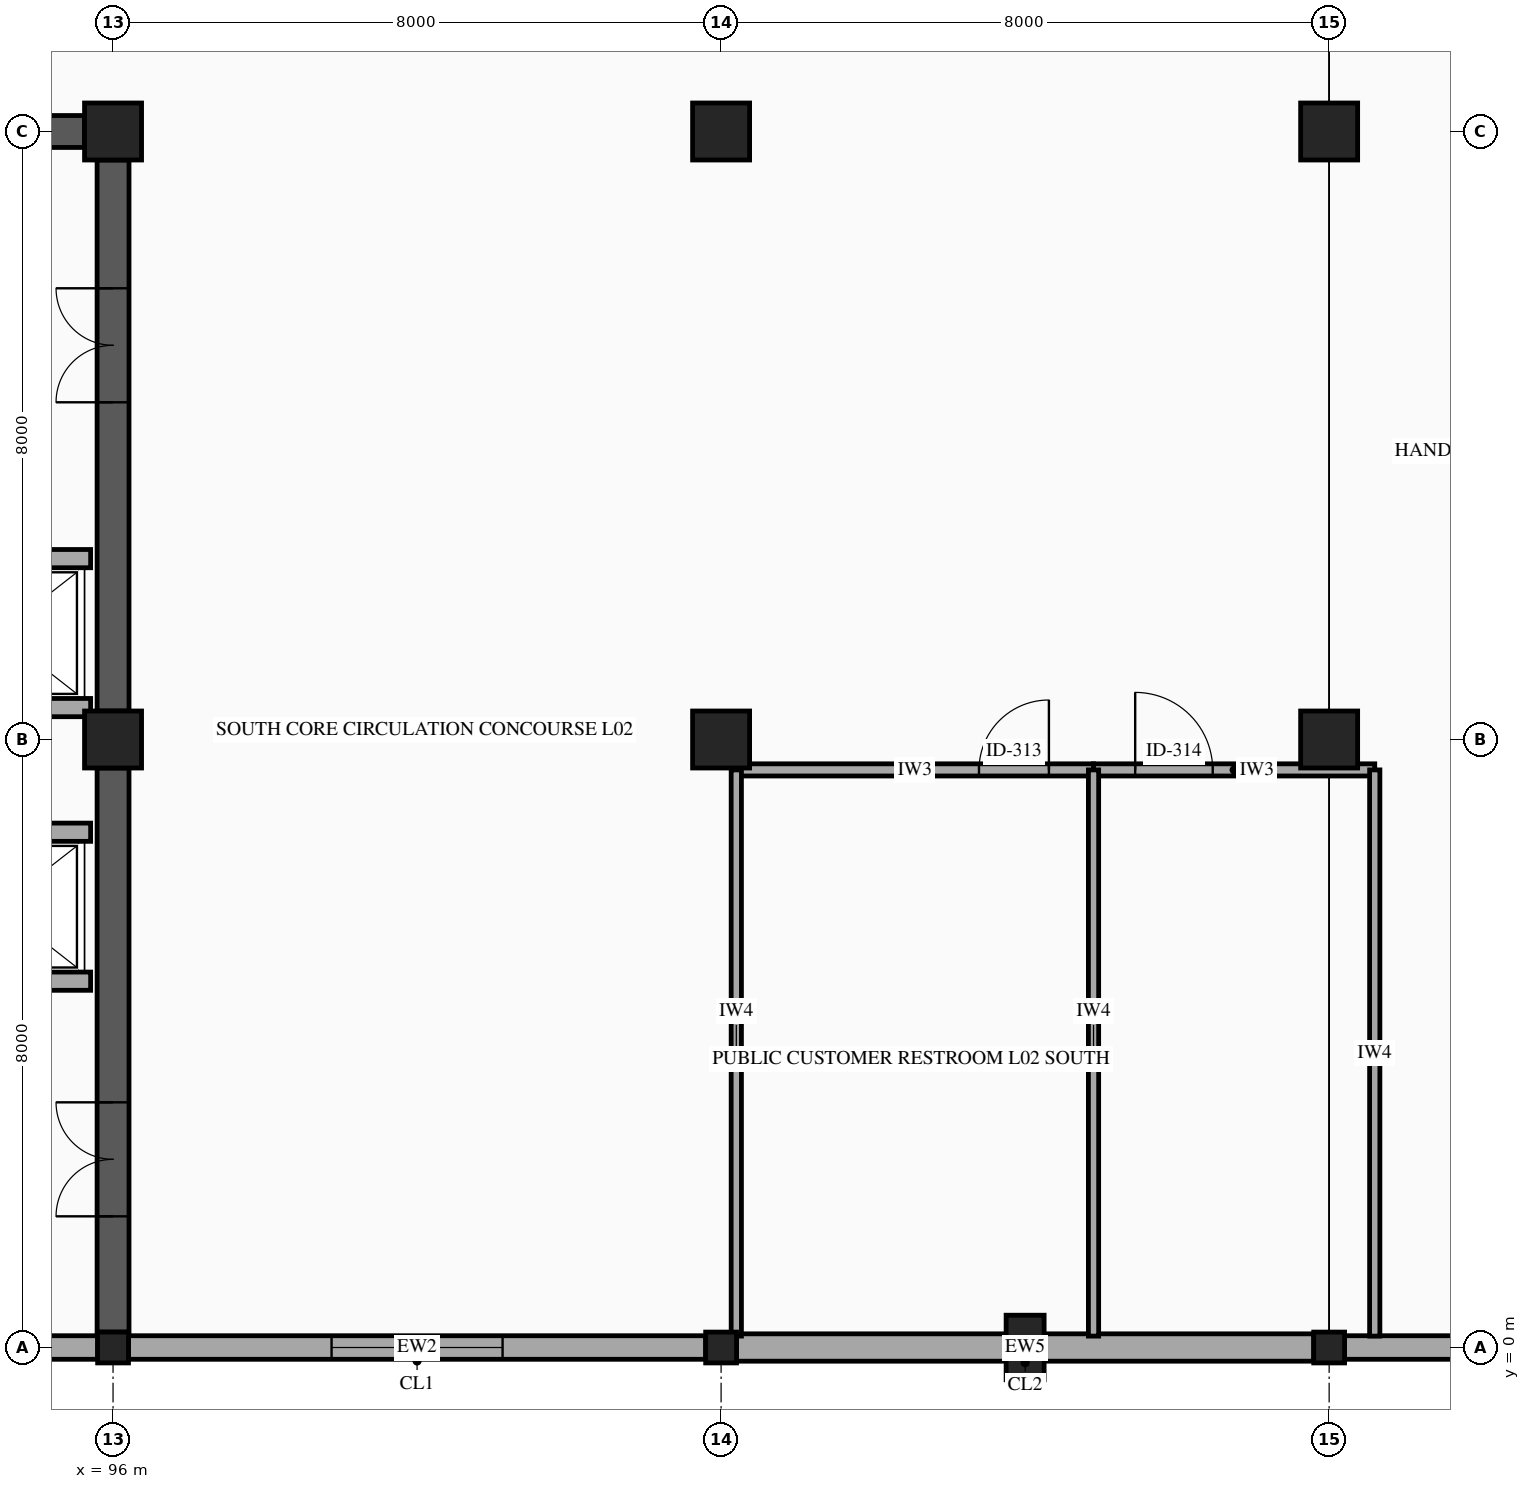
"""IFC4 building model, lengths in metres.
Left out: names, types, materials, properties, quantities, classifications, styles, units other than length and angle.
Written with IfcOpenShell. Run it as: python <this file> out.ifc"""

import sys

from ifc_helpers import new_model, si_unit, direction, frame, frame_2d, origin, origin_2d, place, context, subcontext, project, spatial, rectangle, hollow_rectangle, extrude, element, fill, save


model = new_model("IFC4")
c1 = context("Model", 3, precision=1e-05, world=origin(), true_north=direction((0.0, 1.0)))
c2 = subcontext(c1, "Body", "Model", "MODEL_VIEW")
j1 = project(units=[si_unit("LENGTHUNIT", "METRE"), si_unit("PLANEANGLEUNIT", "RADIAN")], contexts=[c1])
p1 = place(None, origin())
s1 = spatial("IfcSite", under=j1, at=p1, CompositionType="ELEMENT")
p2 = place(p1, origin())
s2 = spatial("IfcBuilding", under=s1, at=p2, CompositionType="ELEMENT")
p3 = place(p2, frame((0.0, 0.0, 10.4)))
s3 = spatial("IfcBuildingStorey", under=s2, at=p3, CompositionType="ELEMENT", Elevation=10.4)
p4 = place(p3, frame((96.0, 0.0, 0.0), z_axis=(0.0, 0.0, 1.0), x_axis=(1.0, 0.0, 0.0)))
e1 = element("IfcColumn", 1, at=p4, inside=s3, PredefinedType="COLUMN", context=c2, shape_type="SweptSolid", body=[
    extrude(hollow_rectangle(XDim=0.406, YDim=0.406, WallThickness=0.015, InnerFilletRadius=0.015, OuterFilletRadius=0.029, at=origin_2d()), origin(), (0.0, 0.0, 1.0), 4.5),
])
for number, where, z_axis, x_axis in (
    (2, (96.0, 8.0, 0.0), (0.0, 0.0, 1.0), (1.0, 0.0, 0.0)),
    (3, (96.0, 16.0, 0.0), (0.0, 0.0, 1.0), (1.0, 0.0, 0.0)),
):
    element("IfcColumn", number, at=place(p3, frame(where, z_axis=z_axis, x_axis=x_axis)), inside=s3, PredefinedType="COLUMN", context=c2, shape_type="SweptSolid", body=[
        extrude(rectangle(XDim=0.75, YDim=0.75, at=origin_2d()), origin(), (0.0, 0.0, 1.0), 4.5),
    ])
p5 = place(p3, frame((104.0, 0.0, 0.0), z_axis=(0.0, 0.0, 1.0), x_axis=(1.0, 0.0, 0.0)))
e4 = element("IfcColumn", 4, at=p5, inside=s3, PredefinedType="COLUMN", context=c2, shape_type="SweptSolid", body=[
    extrude(hollow_rectangle(XDim=0.406, YDim=0.406, WallThickness=0.015, InnerFilletRadius=0.015, OuterFilletRadius=0.029, at=origin_2d()), origin(), (0.0, 0.0, 1.0), 4.5),
])
for number, where, z_axis, x_axis in (
    (5, (104.0, 8.0, 0.0), (0.0, 0.0, 1.0), (1.0, 0.0, 0.0)),
    (6, (104.0, 16.0, 0.0), (0.0, 0.0, 1.0), (1.0, 0.0, 0.0)),
):
    element("IfcColumn", number, at=place(p3, frame(where, z_axis=z_axis, x_axis=x_axis)), inside=s3, PredefinedType="COLUMN", context=c2, shape_type="SweptSolid", body=[
        extrude(rectangle(XDim=0.75, YDim=0.75, at=origin_2d()), origin(), (0.0, 0.0, 1.0), 4.5),
    ])
p6 = place(p3, frame((112.0, 0.0, 0.0), z_axis=(0.0, 0.0, 1.0), x_axis=(1.0, 0.0, 0.0)))
e7 = element("IfcColumn", 7, at=p6, inside=s3, PredefinedType="COLUMN", context=c2, shape_type="SweptSolid", body=[
    extrude(hollow_rectangle(XDim=0.406, YDim=0.406, WallThickness=0.015, InnerFilletRadius=0.015, OuterFilletRadius=0.029, at=origin_2d()), origin(), (0.0, 0.0, 1.0), 4.5),
])
for number, where, z_axis, x_axis in (
    (8, (112.0, 8.0, 0.0), (0.0, 0.0, 1.0), (1.0, 0.0, 0.0)),
    (9, (112.0, 16.0, 0.0), (0.0, 0.0, 1.0), (1.0, 0.0, 0.0)),
):
    element("IfcColumn", number, at=place(p3, frame(where, z_axis=z_axis, x_axis=x_axis)), inside=s3, PredefinedType="COLUMN", context=c2, shape_type="SweptSolid", body=[
        extrude(rectangle(XDim=0.75, YDim=0.75, at=origin_2d()), origin(), (0.0, 0.0, 1.0), 4.5),
    ])
p7 = place(p3, frame((108.0, 0.0, 0.0), z_axis=(0.0, 0.0, 1.0), x_axis=(1.0, 0.0, 0.0)))
e10 = element("IfcColumn", 10, at=p7, inside=s3, PredefinedType="PILASTER", context=c2, shape_type="SweptSolid", body=[
    extrude(rectangle(XDim=0.5, YDim=0.85, at=origin_2d()), origin(), (0.0, 0.0, 1.0), 4.5),
])
p8 = place(p3, frame((119.797, 0.0, 0.0), z_axis=(0.0, 0.0, 1.0), x_axis=(-1.0, 0.0, 0.0)))
e11 = element("IfcWall", 11, at=p8, inside=s3, PredefinedType="STANDARD", context=c2, shape_type="SweptSolid", body=[
    extrude(rectangle(XDim=7.594, YDim=0.31, at=frame_2d((3.797, 0.0))), origin(), (0.0, 0.0, 1.0), 3.48),
])
p9 = place(p8, frame((2.672, 0.0, 0.8)))
e12 = element("IfcOpeningElement", 12, at=p9, cuts=e11, PredefinedType="OPENING", context=c2, shape_type="SweptSolid", body=[
    extrude(rectangle(XDim=2.25, YDim=1.75, at=frame_2d((1.125, 0.875))), frame((0.0, 0.165, 0.0), z_axis=(0.0, -1.0, 0.0), x_axis=(1.0, 0.0, 0.0)), (0.0, 0.0, 1.0), 0.33),
])
p10 = place(p3, frame((111.797, 0.0, 0.0), z_axis=(0.0, 0.0, 1.0), x_axis=(-1.0, 0.0, 0.0)))
e13 = element("IfcWall", 13, at=p10, inside=s3, PredefinedType="SOLIDWALL", context=c2, shape_type="SweptSolid", body=[
    extrude(rectangle(XDim=7.594, YDim=0.36, at=frame_2d((3.797, 0.0))), origin(), (0.0, 0.0, 1.0), 3.48),
])
p11 = place(p3, frame((103.797, 0.0, 0.0), z_axis=(0.0, 0.0, 1.0), x_axis=(-1.0, 0.0, 0.0)))
e14 = element("IfcWall", 14, at=p11, inside=s3, PredefinedType="STANDARD", context=c2, shape_type="SweptSolid", body=[
    extrude(rectangle(XDim=7.594, YDim=0.31, at=frame_2d((3.797, 0.0))), origin(), (0.0, 0.0, 1.0), 3.48),
])
p12 = place(p11, frame((2.672, 0.0, 0.8)))
e15 = element("IfcOpeningElement", 15, at=p12, cuts=e14, PredefinedType="OPENING", context=c2, shape_type="SweptSolid", body=[
    extrude(rectangle(XDim=2.25, YDim=1.75, at=frame_2d((1.125, 0.875))), frame((0.0, 0.165, 0.0), z_axis=(0.0, -1.0, 0.0), x_axis=(1.0, 0.0, 0.0)), (0.0, 0.0, 1.0), 0.33),
])
p13 = place(p3, frame((95.797, 0.0, 0.0), z_axis=(0.0, 0.0, 1.0), x_axis=(-1.0, 0.0, 0.0)))
e16 = element("IfcWall", 16, at=p13, inside=s3, PredefinedType="STANDARD", context=c2, shape_type="SweptSolid", body=[
    extrude(rectangle(XDim=7.594, YDim=0.31, at=frame_2d((3.797, 0.0))), origin(), (0.0, 0.0, 1.0), 3.48),
])
p14 = place(p3, frame((88.375, 16.0, 0.0), z_axis=(0.0, 0.0, 1.0), x_axis=(1.0, 0.0, 0.0)))
e17 = element("IfcWall", 17, at=p14, inside=s3, PredefinedType="SHEAR", context=c2, shape_type="SweptSolid", body=[
    extrude(rectangle(XDim=7.25, YDim=0.42, at=frame_2d((3.625, 0.0))), origin(), (0.0, 0.0, 1.0), 4.28),
])
p15 = place(p14, frame((2.875, 0.0, 0.0)))
e18 = element("IfcOpeningElement", 18, at=p15, cuts=e17, PredefinedType="OPENING", context=c2, shape_type="SweptSolid", body=[
    extrude(rectangle(XDim=1.5, YDim=2.15, at=frame_2d((0.75, 1.075))), frame((0.0, 0.22, 0.0), z_axis=(0.0, -1.0, 0.0), x_axis=(1.0, 0.0, 0.0)), (0.0, 0.0, 1.0), 0.44),
])
p16 = place(p3, frame((96.0, 0.203, 0.0), z_axis=(0.0, 0.0, 1.0), x_axis=(0.0, 1.0, 0.0)))
e19 = element("IfcWall", 19, at=p16, inside=s3, PredefinedType="SHEAR", context=c2, shape_type="SweptSolid", body=[
    extrude(rectangle(XDim=7.422, YDim=0.42, at=frame_2d((3.711, 0.0))), origin(), (0.0, 0.0, 1.0), 4.28),
])
p17 = place(p16, frame((1.523, 0.0, 0.0)))
e20 = element("IfcOpeningElement", 20, at=p17, cuts=e19, PredefinedType="OPENING", context=c2, shape_type="SweptSolid", body=[
    extrude(rectangle(XDim=1.5, YDim=2.15, at=frame_2d((0.75, 1.075))), frame((0.0, 0.22, 0.0), z_axis=(0.0, -1.0, 0.0), x_axis=(1.0, 0.0, 0.0)), (0.0, 0.0, 1.0), 0.44),
])
p18 = place(p3, frame((96.0, 8.375, 0.0), z_axis=(0.0, 0.0, 1.0), x_axis=(0.0, 1.0, 0.0)))
e21 = element("IfcWall", 21, at=p18, inside=s3, PredefinedType="SHEAR", context=c2, shape_type="SweptSolid", body=[
    extrude(rectangle(XDim=7.25, YDim=0.42, at=frame_2d((3.625, 0.0))), origin(), (0.0, 0.0, 1.0), 4.28),
])
p19 = place(p18, frame((4.062, 0.0, 0.0)))
e22 = element("IfcOpeningElement", 22, at=p19, cuts=e21, PredefinedType="OPENING", context=c2, shape_type="SweptSolid", body=[
    extrude(rectangle(XDim=1.5, YDim=2.15, at=frame_2d((0.75, 1.075))), frame((0.0, 0.22, 0.0), z_axis=(0.0, -1.0, 0.0), x_axis=(1.0, 0.0, 0.0)), (0.0, 0.0, 1.0), 0.44),
])
p20 = place(p3, frame((93.295, 6.78, 0.0), z_axis=(0.0, 0.0, 1.0), x_axis=(1.0, 0.0, 0.0)))
e23 = element("IfcWall", 23, at=p20, inside=s3, PredefinedType="PARTITIONING", context=c2, shape_type="SweptSolid", body=[
    extrude(rectangle(XDim=2.41, YDim=0.24, at=frame_2d((1.205, 0.0))), origin(), (0.0, 0.0, 1.0), 4.28),
])
p21 = place(p20, frame((0.655, 0.0, 0.0)))
e24 = element("IfcOpeningElement", 24, at=p21, cuts=e23, PredefinedType="OPENING", context=c2, shape_type="SweptSolid", body=[
    extrude(rectangle(XDim=1.1, YDim=2.15, at=frame_2d((0.55, 1.075))), frame((0.0, 0.13, 0.0), z_axis=(0.0, -1.0, 0.0), x_axis=(1.0, 0.0, 0.0)), (0.0, 0.0, 1.0), 0.26),
])
p22 = place(p3, frame((93.295, 4.82, 0.0), z_axis=(0.0, 0.0, 1.0), x_axis=(1.0, 0.0, 0.0)))
e25 = element("IfcWall", 25, at=p22, inside=s3, PredefinedType="PARTITIONING", context=c2, shape_type="SweptSolid", body=[
    extrude(rectangle(XDim=2.41, YDim=0.24, at=frame_2d((1.205, 0.0))), origin(), (0.0, 0.0, 1.0), 4.28),
])
p23 = place(p3, frame((93.295, 10.38, 0.0), z_axis=(0.0, 0.0, 1.0), x_axis=(1.0, 0.0, 0.0)))
e26 = element("IfcWall", 26, at=p23, inside=s3, PredefinedType="PARTITIONING", context=c2, shape_type="SweptSolid", body=[
    extrude(rectangle(XDim=2.41, YDim=0.24, at=frame_2d((1.205, 0.0))), origin(), (0.0, 0.0, 1.0), 4.28),
])
p24 = place(p23, frame((0.655, 0.0, 0.0)))
e27 = element("IfcOpeningElement", 27, at=p24, cuts=e26, PredefinedType="OPENING", context=c2, shape_type="SweptSolid", body=[
    extrude(rectangle(XDim=1.1, YDim=2.15, at=frame_2d((0.55, 1.075))), frame((0.0, 0.13, 0.0), z_axis=(0.0, -1.0, 0.0), x_axis=(1.0, 0.0, 0.0)), (0.0, 0.0, 1.0), 0.26),
])
p25 = place(p3, frame((93.295, 8.42, 0.0), z_axis=(0.0, 0.0, 1.0), x_axis=(1.0, 0.0, 0.0)))
e28 = element("IfcWall", 28, at=p25, inside=s3, PredefinedType="PARTITIONING", context=c2, shape_type="SweptSolid", body=[
    extrude(rectangle(XDim=2.41, YDim=0.24, at=frame_2d((1.205, 0.0))), origin(), (0.0, 0.0, 1.0), 4.28),
])
p26 = place(p3, frame((104.2, 7.6, 0.0), z_axis=(0.0, 0.0, 1.0), x_axis=(1.0, 0.0, 0.0)))
e29 = element("IfcWall", 29, at=p26, inside=s3, PredefinedType="PARTITIONING", context=c2, shape_type="SweptSolid", body=[
    extrude(rectangle(XDim=4.7, YDim=0.16, at=frame_2d((2.35, 0.0))), origin(), (0.0, 0.0, 1.0), 3.48),
])
p27 = place(p26, frame((3.193, 0.0, 0.0)))
e30 = element("IfcOpeningElement", 30, at=p27, cuts=e29, PredefinedType="OPENING", context=c2, shape_type="SweptSolid", body=[
    extrude(rectangle(XDim=0.92, YDim=2.1, at=frame_2d((0.46, 1.05))), frame((0.0, 0.09, 0.0), z_axis=(0.0, -1.0, 0.0), x_axis=(1.0, 0.0, 0.0)), (0.0, 0.0, 1.0), 0.18),
])
p28 = place(p3, frame((108.9, 7.6, 0.0), z_axis=(0.0, 0.0, 1.0), x_axis=(1.0, 0.0, 0.0)))
e31 = element("IfcWall", 31, at=p28, inside=s3, PredefinedType="PARTITIONING", context=c2, shape_type="SweptSolid", body=[
    extrude(rectangle(XDim=3.7, YDim=0.16, at=frame_2d((1.85, 0.0))), origin(), (0.0, 0.0, 1.0), 3.48),
])
p29 = place(p28, frame((0.548, 0.0, 0.0)))
e32 = element("IfcOpeningElement", 32, at=p29, cuts=e31, PredefinedType="OPENING", context=c2, shape_type="SweptSolid", body=[
    extrude(rectangle(XDim=1.02, YDim=2.1, at=frame_2d((0.51, 1.05))), frame((0.0, 0.09, 0.0), z_axis=(0.0, -1.0, 0.0), x_axis=(1.0, 0.0, 0.0)), (0.0, 0.0, 1.0), 0.18),
])
for number, where, z_axis, x_axis in (
    (33, (104.2, 0.15, 0.0), (0.0, 0.0, 1.0), (0.0, 1.0, 0.0)),
    (34, (108.9, 0.15, 0.0), (0.0, 0.0, 1.0), (0.0, 1.0, 0.0)),
    (35, (112.6, 0.15, 0.0), (0.0, 0.0, 1.0), (0.0, 1.0, 0.0)),
):
    element("IfcWall", number, at=place(p3, frame(where, z_axis=z_axis, x_axis=x_axis)), inside=s3, PredefinedType="PARTITIONING", context=c2, shape_type="SweptSolid", body=[
        extrude(rectangle(XDim=7.45, YDim=0.135, at=frame_2d((3.725, 0.0))), origin(), (0.0, 0.0, 1.0), 3.48),
    ])
p30 = place(p12, origin())
e36 = element("IfcWindow", 36, at=p30, inside=s3, PartitioningType="DOUBLE_PANEL_VERTICAL", PredefinedType="WINDOW", context=c2, shape_type="SweptSolid", body=[
    extrude(rectangle(XDim=2.25, YDim=1.75, at=frame_2d((1.125, 0.875))), frame((0.0, 0.03, 0.0), z_axis=(0.0, -1.0, 0.0), x_axis=(1.0, 0.0, 0.0)), (0.0, 0.0, 1.0), 0.06),
])
fill(e15, e36)
p31 = place(p17, origin())
e37 = element("IfcDoor", 37, at=p31, inside=s3, OperationType="DOUBLE_DOOR_SINGLE_SWING", PredefinedType="DOOR", context=c2, shape_type="SweptSolid", body=[
    extrude(rectangle(XDim=1.5, YDim=2.15, at=frame_2d((0.75, 1.075))), frame((0.0, 0.025, 0.0), z_axis=(0.0, -1.0, 0.0), x_axis=(1.0, 0.0, 0.0)), (0.0, 0.0, 1.0), 0.05),
])
fill(e20, e37)
p32 = place(p19, origin())
e38 = element("IfcDoor", 38, at=p32, inside=s3, OperationType="DOUBLE_DOOR_SINGLE_SWING", PredefinedType="DOOR", context=c2, shape_type="SweptSolid", body=[
    extrude(rectangle(XDim=1.5, YDim=2.15, at=frame_2d((0.75, 1.075))), frame((0.0, 0.025, 0.0), z_axis=(0.0, -1.0, 0.0), x_axis=(1.0, 0.0, 0.0)), (0.0, 0.0, 1.0), 0.05),
])
fill(e22, e38)
p33 = place(p27, origin())
e39 = element("IfcDoor", 39, at=p33, inside=s3, OperationType="SINGLE_SWING_RIGHT", PredefinedType="DOOR", context=c2, shape_type="SweptSolid", body=[
    extrude(rectangle(XDim=0.92, YDim=2.1, at=frame_2d((0.46, 1.05))), frame((0.0, 0.025, 0.0), z_axis=(0.0, -1.0, 0.0), x_axis=(1.0, 0.0, 0.0)), (0.0, 0.0, 1.0), 0.05),
])
fill(e30, e39)
p34 = place(p29, origin())
e40 = element("IfcDoor", 40, at=p34, inside=s3, OperationType="SINGLE_SWING_LEFT", PredefinedType="DOOR", context=c2, shape_type="SweptSolid", body=[
    extrude(rectangle(XDim=1.02, YDim=2.1, at=frame_2d((0.51, 1.05))), frame((0.0, 0.025, 0.0), z_axis=(0.0, -1.0, 0.0), x_axis=(1.0, 0.0, 0.0)), (0.0, 0.0, 1.0), 0.05),
])
fill(e32, e40)
save(model, sys.argv[1])
